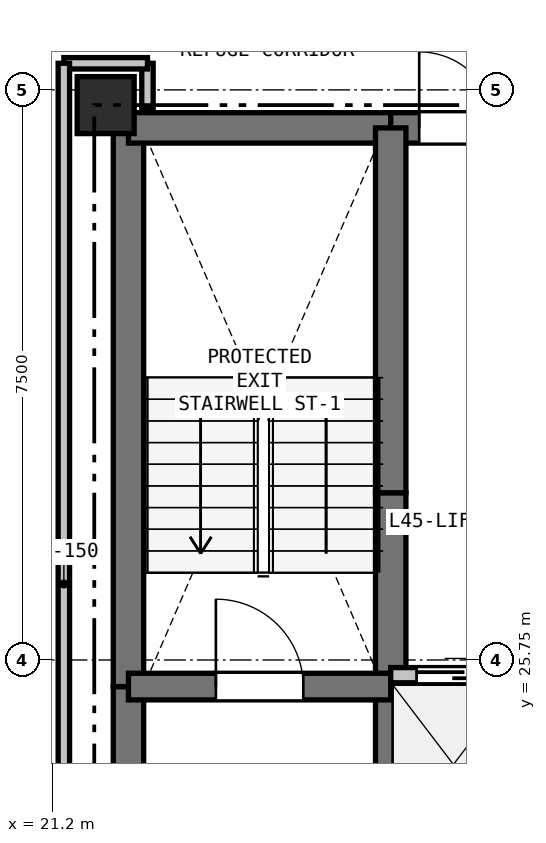
"""IFC4 building model, lengths in metres.
Left out: names, types, materials, properties, quantities, classifications, styles, units other than length and angle.
Written with IfcOpenShell. Run it as: python <this file> out.ifc"""

import sys

from ifc_helpers import new_model, si_unit, direction, frame, frame_2d, origin, origin_2d, place, context, subcontext, project, spatial, rectangle, extrude, element, fill, save


model = new_model("IFC4")
c1 = context("Model", 3, precision=1e-05, world=origin(), true_north=direction((0.0, 1.0)))
c2 = subcontext(c1, "Body", "Model", "MODEL_VIEW")
j1 = project(units=[si_unit("LENGTHUNIT", "METRE"), si_unit("PLANEANGLEUNIT", "RADIAN")], contexts=[c1])
p1 = place(None, origin())
s1 = spatial("IfcSite", under=j1, at=p1, CompositionType="ELEMENT")
p2 = place(p1, origin())
s2 = spatial("IfcBuilding", under=s1, at=p2, CompositionType="ELEMENT")
p3 = place(p2, frame((0.0, 0.0, 160.8)))
s3 = spatial("IfcBuildingStorey", under=s2, at=p3, CompositionType="ELEMENT", Elevation=160.8)
p4 = place(p3, frame((21.9, 33.05, 0.0), z_axis=(0.0, 0.0, 1.0), x_axis=(1.0, 0.0, 0.0)))
e1 = element("IfcColumn", 1, at=p4, inside=s3, PredefinedType="COLUMN", context=c2, shape_type="SweptSolid", body=[
    extrude(rectangle(XDim=0.75, YDim=0.75, at=origin_2d()), origin(), (0.0, 0.0, 1.0), 6.6),
])
p5 = place(p3, frame((8.31, 28.048, 0.0), z_axis=(0.0, 0.0, 1.0), x_axis=(0.866026432802, 0.499998217685, 0.0)))
e2 = element("IfcWall", 2, at=p5, inside=s3, PredefinedType="SOLIDWALL", context=c2, shape_type="SweptSolid", body=[
    extrude(rectangle(XDim=34.537, YDim=0.25, at=frame_2d((17.269, 0.0))), origin(), (0.0, 0.0, 1.0), 4.755),
])
p6 = place(p3, frame((38.22, 8.183, 0.0), z_axis=(0.0, 0.0, 1.0), x_axis=(-0.866026432802, 0.499998217685, 0.0)))
e3 = element("IfcWall", 3, at=p6, inside=s3, PredefinedType="SOLIDWALL", context=c2, shape_type="SweptSolid", body=[
    extrude(rectangle(XDim=34.537, YDim=0.25, at=frame_2d((17.269, 0.0))), origin(), (0.0, 0.0, 1.0), 5.005),
])
p7 = place(p3, frame((22.2, 20.75, 0.0), z_axis=(0.0, 0.0, 1.0), x_axis=(0.0, 1.0, 0.0)))
e4 = element("IfcWall", 4, at=p7, inside=s3, PredefinedType="SHEAR", context=c2, shape_type="SweptSolid", body=[
    extrude(rectangle(XDim=4.65, YDim=0.4, at=frame_2d((2.325, 0.0))), origin(), (0.0, 0.0, 1.0), 6.37),
])
p8 = place(p3, frame((22.2, 25.4, 0.0), z_axis=(0.0, 0.0, 1.0), x_axis=(0.0, 1.0, 0.0)))
e5 = element("IfcWall", 5, at=p8, inside=s3, PredefinedType="SHEAR", context=c2, shape_type="SweptSolid", body=[
    extrude(rectangle(XDim=7.35, YDim=0.4, at=frame_2d((3.675, 0.0))), origin(), (0.0, 0.0, 1.0), 6.37),
])
p9 = place(p3, frame((22.2, 32.75, 0.0), z_axis=(0.0, 0.0, 1.0), x_axis=(1.0, 0.0, 0.0)))
e6 = element("IfcWall", 6, at=p9, inside=s3, PredefinedType="SHEAR", context=c2, shape_type="SweptSolid", body=[
    extrude(rectangle(XDim=3.45, YDim=0.4, at=frame_2d((1.725, 0.0))), origin(), (0.0, 0.0, 1.0), 6.37),
])
p10 = place(p3, frame((25.65, 32.75, 0.0), z_axis=(0.0, 0.0, 1.0), x_axis=(1.0, 0.0, 0.0)))
e7 = element("IfcWall", 7, at=p10, inside=s3, PredefinedType="SHEAR", context=c2, shape_type="SweptSolid", body=[
    extrude(rectangle(XDim=1.75, YDim=0.4, at=frame_2d((0.875, 0.0))), origin(), (0.0, 0.0, 1.0), 6.37),
])
p11 = place(p10, frame((0.375, 0.0, 0.0)))
e8 = element("IfcOpeningElement", 8, at=p11, cuts=e7, PredefinedType="OPENING", context=c2, shape_type="SweptSolid", body=[
    extrude(rectangle(XDim=1.0, YDim=2.15, at=frame_2d((0.5, 1.075))), frame((0.0, 0.21, 0.0), z_axis=(0.0, -1.0, 0.0), x_axis=(1.0, 0.0, 0.0)), (0.0, 0.0, 1.0), 0.42),
])
p12 = place(p3, frame((25.65, 22.75, 0.0), z_axis=(0.0, 0.0, 1.0), x_axis=(0.0, 1.0, 0.0)))
e9 = element("IfcWall", 9, at=p12, inside=s3, PredefinedType="SHEAR", context=c2, shape_type="SweptSolid", body=[
    extrude(rectangle(XDim=2.8, YDim=0.4, at=frame_2d((1.4, 0.0))), origin(), (0.0, 0.0, 1.0), 6.37),
])
p13 = place(p3, frame((25.65, 25.55, 0.0), z_axis=(0.0, 0.0, 1.0), x_axis=(0.0, 1.0, 0.0)))
e10 = element("IfcWall", 10, at=p13, inside=s3, PredefinedType="SHEAR", context=c2, shape_type="SweptSolid", body=[
    extrude(rectangle(XDim=2.4, YDim=0.4, at=frame_2d((1.2, 0.0))), origin(), (0.0, 0.0, 1.0), 6.37),
])
p14 = place(p3, frame((25.65, 27.95, 0.0), z_axis=(0.0, 0.0, 1.0), x_axis=(0.0, 1.0, 0.0)))
e11 = element("IfcWall", 11, at=p14, inside=s3, PredefinedType="SHEAR", context=c2, shape_type="SweptSolid", body=[
    extrude(rectangle(XDim=4.8, YDim=0.4, at=frame_2d((2.4, 0.0))), origin(), (0.0, 0.0, 1.0), 6.37),
])
p15 = place(p3, frame((22.2, 25.4, 0.0), z_axis=(0.0, 0.0, 1.0), x_axis=(1.0, 0.0, 0.0)))
e12 = element("IfcWall", 12, at=p15, inside=s3, PredefinedType="SHEAR", context=c2, shape_type="SweptSolid", body=[
    extrude(rectangle(XDim=3.45, YDim=0.35, at=frame_2d((1.725, 0.0))), origin(), (0.0, 0.0, 1.0), 6.37),
])
p16 = place(p15, frame((1.15, 0.0, 0.0)))
e13 = element("IfcOpeningElement", 13, at=p16, cuts=e12, PredefinedType="OPENING", context=c2, shape_type="SweptSolid", body=[
    extrude(rectangle(XDim=1.15, YDim=2.15, at=frame_2d((0.575, 1.075))), frame((0.0, 0.185, 0.0), z_axis=(0.0, -1.0, 0.0), x_axis=(1.0, 0.0, 0.0)), (0.0, 0.0, 1.0), 0.37),
])
p17 = place(p3, frame((25.65, 25.55, 0.0), z_axis=(0.0, 0.0, 1.0), x_axis=(1.0, 0.0, 0.0)))
e14 = element("IfcWall", 14, at=p17, inside=s3, PredefinedType="PARTITIONING", context=c2, shape_type="SweptSolid", body=[
    extrude(rectangle(XDim=4.95, YDim=0.2, at=frame_2d((2.475, 0.0))), origin(), (0.0, 0.0, 1.0), 6.37),
])
p18 = place(p17, frame((0.34, 0.0, 0.0)))
e15 = element("IfcOpeningElement", 15, at=p18, cuts=e14, PredefinedType="OPENING", context=c2, shape_type="SweptSolid", body=[
    extrude(rectangle(XDim=1.1, YDim=2.15, at=frame_2d((0.55, 1.075))), frame((0.0, 0.11, 0.0), z_axis=(0.0, -1.0, 0.0), x_axis=(1.0, 0.0, 0.0)), (0.0, 0.0, 1.0), 0.22),
])
p19 = place(p17, frame((1.99, 0.0, 0.0)))
e16 = element("IfcOpeningElement", 16, at=p19, cuts=e14, PredefinedType="OPENING", context=c2, shape_type="SweptSolid", body=[
    extrude(rectangle(XDim=1.1, YDim=2.15, at=frame_2d((0.55, 1.075))), frame((0.0, 0.11, 0.0), z_axis=(0.0, -1.0, 0.0), x_axis=(1.0, 0.0, 0.0)), (0.0, 0.0, 1.0), 0.22),
])
p20 = place(p17, frame((3.64, 0.0, 0.0)))
e17 = element("IfcOpeningElement", 17, at=p20, cuts=e14, PredefinedType="OPENING", context=c2, shape_type="SweptSolid", body=[
    extrude(rectangle(XDim=1.1, YDim=2.15, at=frame_2d((0.55, 1.075))), frame((0.0, 0.11, 0.0), z_axis=(0.0, -1.0, 0.0), x_axis=(1.0, 0.0, 0.0)), (0.0, 0.0, 1.0), 0.22),
])
p21 = place(p3, frame((22.45, 33.0, 0.0), z_axis=(0.0, 0.0, 1.0), x_axis=(0.0, 1.0, 0.0)))
e18 = element("IfcWall", 18, at=p21, inside=s3, PredefinedType="PARTITIONING", context=c2, shape_type="SweptSolid", body=[
    extrude(rectangle(XDim=0.6, YDim=0.15, at=frame_2d((0.3, 0.0))), origin(), (0.0, 0.0, 1.0), 5.895),
])
p22 = place(p3, frame((22.45, 33.6, 0.0), z_axis=(0.0, 0.0, 1.0), x_axis=(-1.0, 0.0, 0.0)))
e19 = element("IfcWall", 19, at=p22, inside=s3, PredefinedType="PARTITIONING", context=c2, shape_type="SweptSolid", body=[
    extrude(rectangle(XDim=1.1, YDim=0.15, at=frame_2d((0.55, 0.0))), origin(), (0.0, 0.0, 1.0), 6.37),
])
p23 = place(p3, frame((21.35, 33.6, 0.0), z_axis=(0.0, 0.0, 1.0), x_axis=(0.0, -1.0, 0.0)))
e20 = element("IfcWall", 20, at=p23, inside=s3, PredefinedType="PARTITIONING", context=c2, shape_type="SweptSolid", body=[
    extrude(rectangle(XDim=13.7, YDim=0.15, at=frame_2d((6.85, 0.0))), origin(), (0.0, 0.0, 1.0), 4.755),
])
p24 = place(p18, origin())
e21 = element("IfcDoor", 21, at=p24, inside=s3, OperationType="SLIDING_TO_LEFT", PredefinedType="DOOR", context=c2, shape_type="SweptSolid", body=[
    extrude(rectangle(XDim=1.1, YDim=2.15, at=frame_2d((0.55, 1.075))), frame((0.0, 0.025, 0.0), z_axis=(0.0, -1.0, 0.0), x_axis=(1.0, 0.0, 0.0)), (0.0, 0.0, 1.0), 0.05),
])
fill(e15, e21)
p25 = place(p11, origin())
e22 = element("IfcDoor", 22, at=p25, inside=s3, OperationType="SINGLE_SWING_LEFT", PredefinedType="DOOR", context=c2, shape_type="SweptSolid", body=[
    extrude(rectangle(XDim=1.0, YDim=2.15, at=frame_2d((0.5, 1.075))), frame((0.0, 0.025, 0.0), z_axis=(0.0, -1.0, 0.0), x_axis=(1.0, 0.0, 0.0)), (0.0, 0.0, 1.0), 0.05),
])
fill(e8, e22)
p26 = place(p16, origin())
e23 = element("IfcDoor", 23, at=p26, inside=s3, OperationType="SINGLE_SWING_LEFT", PredefinedType="DOOR", context=c2, shape_type="SweptSolid", body=[
    extrude(rectangle(XDim=1.15, YDim=2.15, at=frame_2d((0.575, 1.075))), frame((0.0, 0.025, 0.0), z_axis=(0.0, -1.0, 0.0), x_axis=(1.0, 0.0, 0.0)), (0.0, 0.0, 1.0), 0.05),
])
fill(e13, e23)
save(model, sys.argv[1])
